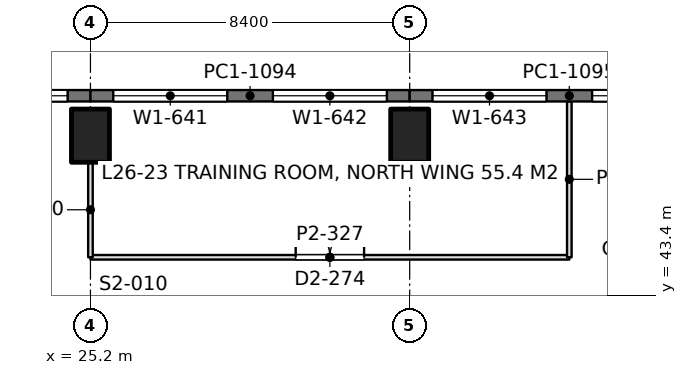
"""IFC4 building model, lengths in metres.
Left out: names, types, materials, properties, quantities, classifications, styles, units other than length and angle.
Written with IfcOpenShell. Run it as: python <this file> out.ifc"""

import sys

from ifc_helpers import new_model, si_unit, direction, frame, frame_2d, origin, origin_2d, place, context, subcontext, project, spatial, rectangle, extrude, element, fill, save


model = new_model("IFC4")
c1 = context("Model", 3, precision=1e-05, world=origin(), true_north=direction((0.0, 1.0)))
c2 = subcontext(c1, "Body", "Model", "MODEL_VIEW")
j1 = project(units=[si_unit("LENGTHUNIT", "METRE"), si_unit("PLANEANGLEUNIT", "RADIAN")], contexts=[c1])
p1 = place(None, origin())
s1 = spatial("IfcSite", under=j1, at=p1, CompositionType="ELEMENT")
p2 = place(p1, origin())
s2 = spatial("IfcBuilding", under=s1, at=p2, CompositionType="ELEMENT")
p3 = place(p2, frame((0.0, 0.0, 117.6)))
s3 = spatial("IfcBuildingStorey", under=s2, at=p3, CompositionType="ELEMENT", Elevation=117.6)
for number, where, z_axis, x_axis in (
    (1, (25.2, 47.6, 0.0), (0.0, 0.0, 1.0), (1.0, 0.0, 0.0)),
    (2, (33.6, 47.6, 0.0), (0.0, 0.0, 1.0), (1.0, 0.0, 0.0)),
):
    element("IfcColumn", number, at=place(p3, frame(where, z_axis=z_axis, x_axis=x_axis)), inside=s3, PredefinedType="COLUMN", context=c2, shape_type="SweptSolid", body=[
        extrude(rectangle(XDim=1.0, YDim=1.4, at=origin_2d()), origin(), (0.0, 0.0, 1.0), 4.2),
    ])
p4 = place(p3, frame((16.8, 48.65, 0.0), z_axis=(0.0, 0.0, 1.0), x_axis=(1.0, 0.0, 0.0)))
e3 = element("IfcWall", 3, at=p4, inside=s3, PredefinedType="SOLIDWALL", context=c2, shape_type="SweptSolid", body=[
    extrude(rectangle(XDim=8.4, YDim=0.3, at=frame_2d((4.2, 0.0))), origin(), (0.0, 0.0, 1.0), 4.05),
])
p5 = place(p4, frame((0.6, 0.0, 0.9)))
e4 = element("IfcOpeningElement", 4, at=p5, cuts=e3, PredefinedType="OPENING", context=c2, shape_type="SweptSolid", body=[
    extrude(rectangle(XDim=3.0, YDim=1.9, at=frame_2d((1.5, 0.95))), frame((0.0, 0.16, 0.0), z_axis=(0.0, -1.0, 0.0), x_axis=(1.0, 0.0, 0.0)), (0.0, 0.0, 1.0), 0.32),
])
p6 = place(p4, frame((4.8, 0.0, 0.9)))
e5 = element("IfcOpeningElement", 5, at=p6, cuts=e3, PredefinedType="OPENING", context=c2, shape_type="SweptSolid", body=[
    extrude(rectangle(XDim=3.0, YDim=1.9, at=frame_2d((1.5, 0.95))), frame((0.0, 0.16, 0.0), z_axis=(0.0, -1.0, 0.0), x_axis=(1.0, 0.0, 0.0)), (0.0, 0.0, 1.0), 0.32),
])
p7 = place(p3, frame((25.2, 48.65, 0.0), z_axis=(0.0, 0.0, 1.0), x_axis=(1.0, 0.0, 0.0)))
e6 = element("IfcWall", 6, at=p7, inside=s3, PredefinedType="SOLIDWALL", context=c2, shape_type="SweptSolid", body=[
    extrude(rectangle(XDim=8.4, YDim=0.3, at=frame_2d((4.2, 0.0))), origin(), (0.0, 0.0, 1.0), 4.05),
])
p8 = place(p7, frame((0.6, 0.0, 0.9)))
e7 = element("IfcOpeningElement", 7, at=p8, cuts=e6, PredefinedType="OPENING", context=c2, shape_type="SweptSolid", body=[
    extrude(rectangle(XDim=3.0, YDim=1.9, at=frame_2d((1.5, 0.95))), frame((0.0, 0.16, 0.0), z_axis=(0.0, -1.0, 0.0), x_axis=(1.0, 0.0, 0.0)), (0.0, 0.0, 1.0), 0.32),
])
p9 = place(p7, frame((4.8, 0.0, 0.9)))
e8 = element("IfcOpeningElement", 8, at=p9, cuts=e6, PredefinedType="OPENING", context=c2, shape_type="SweptSolid", body=[
    extrude(rectangle(XDim=3.0, YDim=1.9, at=frame_2d((1.5, 0.95))), frame((0.0, 0.16, 0.0), z_axis=(0.0, -1.0, 0.0), x_axis=(1.0, 0.0, 0.0)), (0.0, 0.0, 1.0), 0.32),
])
p10 = place(p3, frame((33.6, 48.65, 0.0), z_axis=(0.0, 0.0, 1.0), x_axis=(1.0, 0.0, 0.0)))
e9 = element("IfcWall", 9, at=p10, inside=s3, PredefinedType="SOLIDWALL", context=c2, shape_type="SweptSolid", body=[
    extrude(rectangle(XDim=8.4, YDim=0.3, at=frame_2d((4.2, 0.0))), origin(), (0.0, 0.0, 1.0), 4.05),
])
p11 = place(p10, frame((0.6, 0.0, 0.9)))
e10 = element("IfcOpeningElement", 10, at=p11, cuts=e9, PredefinedType="OPENING", context=c2, shape_type="SweptSolid", body=[
    extrude(rectangle(XDim=3.0, YDim=1.9, at=frame_2d((1.5, 0.95))), frame((0.0, 0.16, 0.0), z_axis=(0.0, -1.0, 0.0), x_axis=(1.0, 0.0, 0.0)), (0.0, 0.0, 1.0), 0.32),
])
p12 = place(p10, frame((4.8, 0.0, 0.9)))
e11 = element("IfcOpeningElement", 11, at=p12, cuts=e9, PredefinedType="OPENING", context=c2, shape_type="SweptSolid", body=[
    extrude(rectangle(XDim=3.0, YDim=1.9, at=frame_2d((1.5, 0.95))), frame((0.0, 0.16, 0.0), z_axis=(0.0, -1.0, 0.0), x_axis=(1.0, 0.0, 0.0)), (0.0, 0.0, 1.0), 0.32),
])
p13 = place(p3, frame((25.2, 44.4, 0.0), z_axis=(0.0, 0.0, 1.0), x_axis=(1.0, 0.0, 0.0)))
e12 = element("IfcWall", 12, at=p13, inside=s3, PredefinedType="PARTITIONING", context=c2, shape_type="SweptSolid", body=[
    extrude(rectangle(XDim=12.6, YDim=0.12, at=frame_2d((6.3, 0.0))), origin(), (0.0, 0.0, 1.0), 3.55),
])
p14 = place(p13, frame((5.4, 0.0, 0.0)))
e13 = element("IfcOpeningElement", 13, at=p14, cuts=e12, PredefinedType="OPENING", context=c2, shape_type="SweptSolid", body=[
    extrude(rectangle(XDim=1.8, YDim=2.2, at=frame_2d((0.9, 1.1))), frame((0.0, 0.07, 0.0), z_axis=(0.0, -1.0, 0.0), x_axis=(1.0, 0.0, 0.0)), (0.0, 0.0, 1.0), 0.14),
])
p15 = place(p3, frame((25.2, 44.4, 0.0), z_axis=(0.0, 0.0, 1.0), x_axis=(0.0, 1.0, 0.0)))
e14 = element("IfcWall", 14, at=p15, inside=s3, PredefinedType="PARTITIONING", context=c2, shape_type="SweptSolid", body=[
    extrude(rectangle(XDim=2.501, YDim=0.12, at=frame_2d((1.25, 0.0))), origin(), (0.0, 0.0, 1.0), 3.55),
])
p16 = place(p3, frame((37.8, 44.4, 0.0), z_axis=(0.0, 0.0, 1.0), x_axis=(0.0, 1.0, 0.0)))
e15 = element("IfcWall", 15, at=p16, inside=s3, PredefinedType="PARTITIONING", context=c2, shape_type="SweptSolid", body=[
    extrude(rectangle(XDim=4.102, YDim=0.12, at=frame_2d((2.051, 0.0))), origin(), (0.0, 0.0, 1.0), 3.56),
])
p17 = place(p6, origin())
e16 = element("IfcWindow", 16, at=p17, inside=s3, PartitioningType="SINGLE_PANEL", PredefinedType="WINDOW", context=c2, shape_type="SweptSolid", body=[
    extrude(rectangle(XDim=3.0, YDim=1.9, at=frame_2d((1.5, 0.95))), frame((0.0, 0.03, 0.0), z_axis=(0.0, -1.0, 0.0), x_axis=(1.0, 0.0, 0.0)), (0.0, 0.0, 1.0), 0.06),
])
fill(e5, e16)
p18 = place(p8, origin())
e17 = element("IfcWindow", 17, at=p18, inside=s3, PartitioningType="SINGLE_PANEL", PredefinedType="WINDOW", context=c2, shape_type="SweptSolid", body=[
    extrude(rectangle(XDim=3.0, YDim=1.9, at=frame_2d((1.5, 0.95))), frame((0.0, 0.03, 0.0), z_axis=(0.0, -1.0, 0.0), x_axis=(1.0, 0.0, 0.0)), (0.0, 0.0, 1.0), 0.06),
])
fill(e7, e17)
p19 = place(p9, origin())
e18 = element("IfcWindow", 18, at=p19, inside=s3, PartitioningType="SINGLE_PANEL", PredefinedType="WINDOW", context=c2, shape_type="SweptSolid", body=[
    extrude(rectangle(XDim=3.0, YDim=1.9, at=frame_2d((1.5, 0.95))), frame((0.0, 0.03, 0.0), z_axis=(0.0, -1.0, 0.0), x_axis=(1.0, 0.0, 0.0)), (0.0, 0.0, 1.0), 0.06),
])
fill(e8, e18)
p20 = place(p11, origin())
e19 = element("IfcWindow", 19, at=p20, inside=s3, PartitioningType="SINGLE_PANEL", PredefinedType="WINDOW", context=c2, shape_type="SweptSolid", body=[
    extrude(rectangle(XDim=3.0, YDim=1.9, at=frame_2d((1.5, 0.95))), frame((0.0, 0.03, 0.0), z_axis=(0.0, -1.0, 0.0), x_axis=(1.0, 0.0, 0.0)), (0.0, 0.0, 1.0), 0.06),
])
fill(e10, e19)
p21 = place(p12, origin())
e20 = element("IfcWindow", 20, at=p21, inside=s3, PartitioningType="SINGLE_PANEL", PredefinedType="WINDOW", context=c2, shape_type="SweptSolid", body=[
    extrude(rectangle(XDim=3.0, YDim=1.9, at=frame_2d((1.5, 0.95))), frame((0.0, 0.03, 0.0), z_axis=(0.0, -1.0, 0.0), x_axis=(1.0, 0.0, 0.0)), (0.0, 0.0, 1.0), 0.06),
])
fill(e11, e20)
p22 = place(p14, origin())
e21 = element("IfcDoor", 21, at=p22, inside=s3, OperationType="DOUBLE_DOOR_SINGLE_SWING", PredefinedType="DOOR", context=c2, shape_type="SweptSolid", body=[
    extrude(rectangle(XDim=1.8, YDim=2.2, at=frame_2d((0.9, 1.1))), frame((0.0, 0.025, 0.0), z_axis=(0.0, -1.0, 0.0), x_axis=(1.0, 0.0, 0.0)), (0.0, 0.0, 1.0), 0.05),
])
fill(e13, e21)
save(model, sys.argv[1])
